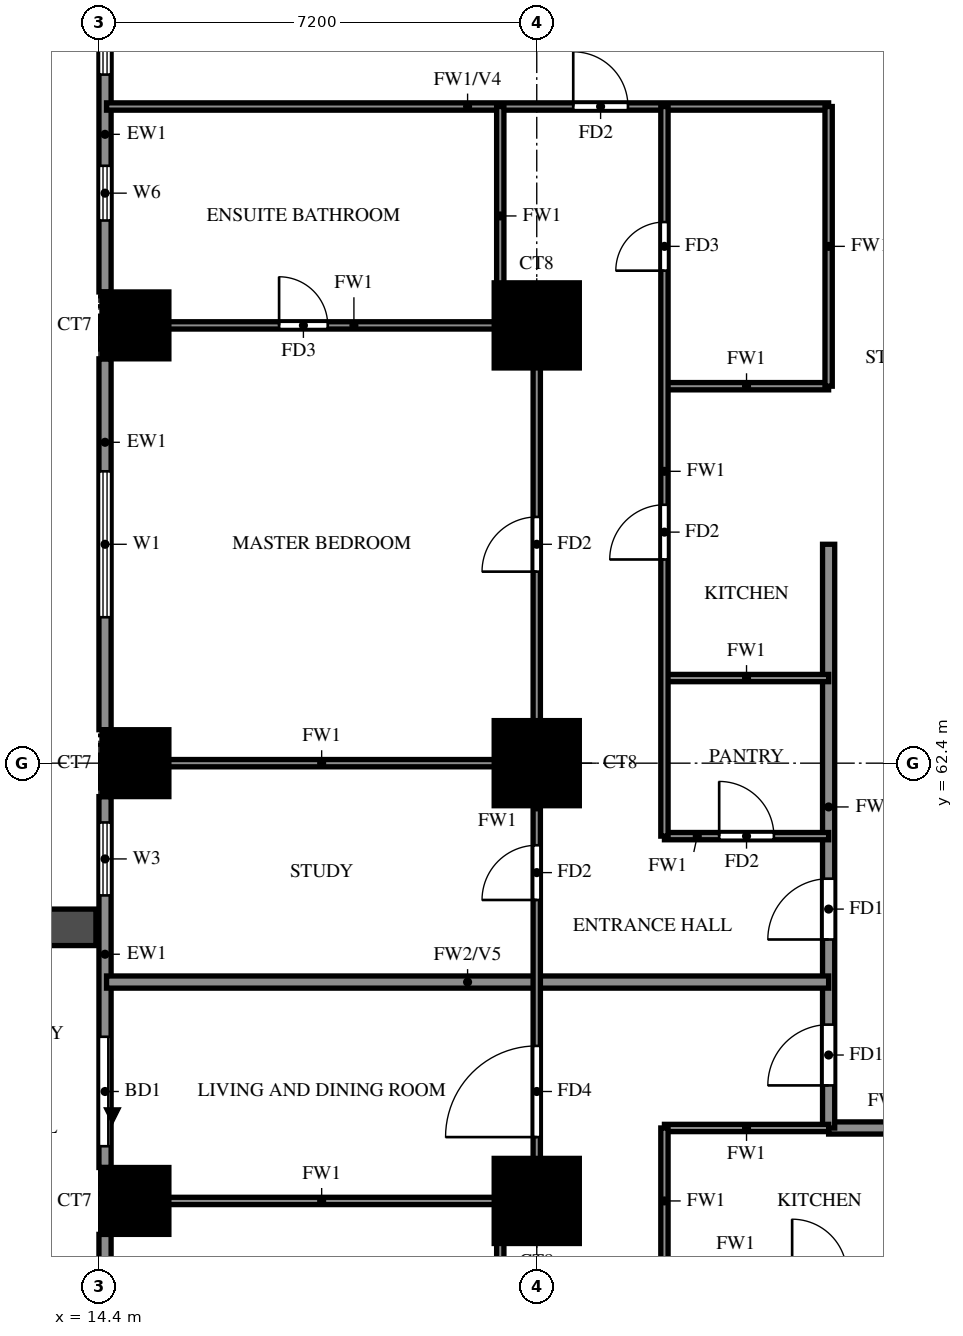
"""IFC4 building model, lengths in metres.
Left out: names, types, materials, properties, quantities, classifications, styles, units other than length and angle.
Written with IfcOpenShell. Run it as: python <this file> out.ifc"""

import sys

from ifc_helpers import new_model, si_unit, direction, frame, frame_2d, origin, origin_2d, place, context, subcontext, project, spatial, rectangle, extrude, source, transform, mapped, element, fill, save


model = new_model("IFC4")
c1 = context("Model", 3, precision=1e-05, world=origin(), true_north=direction((0.0, 1.0)))
c2 = subcontext(c1, "Body", "Model", "MODEL_VIEW")
j1 = project(units=[si_unit("LENGTHUNIT", "METRE"), si_unit("PLANEANGLEUNIT", "RADIAN")], contexts=[c1])
p1 = place(None, origin())
s1 = spatial("IfcSite", under=j1, at=p1, CompositionType="ELEMENT")
p2 = place(p1, origin())
s2 = spatial("IfcBuilding", under=s1, at=p2, CompositionType="ELEMENT")
p3 = place(p2, frame((0.0, 0.0, 51.5)))
s3 = spatial("IfcBuildingStorey", under=s2, at=p3, CompositionType="ELEMENT", Elevation=51.5)
m1 = source(origin(), c2, "Body", "SweptSolid", [
    extrude(rectangle(XDim=1.1, YDim=1.1, at=origin_2d()), origin(), (0.0, 0.0, 1.0), 3.18),
])
p4 = place(p3, frame((15.0, 55.2, 0.0), z_axis=(0.0, 0.0, 1.0), x_axis=(1.0, 0.0, 0.0)))
e1 = element("IfcColumn", 1, at=p4, inside=s3, PredefinedType="COLUMN", context=c2, shape_type="MappedRepresentation", body=[
    mapped(m1, transform((0.0, 0.0, 0.0))),
])
m2 = source(origin(), c2, "Body", "SweptSolid", [
    extrude(rectangle(XDim=1.4, YDim=1.4, at=origin_2d()), origin(), (0.0, 0.0, 1.0), 3.18),
])
p5 = place(p3, frame((21.6, 55.2, 0.0), z_axis=(0.0, 0.0, 1.0), x_axis=(1.0, 0.0, 0.0)))
e2 = element("IfcColumn", 2, at=p5, inside=s3, PredefinedType="COLUMN", context=c2, shape_type="MappedRepresentation", body=[
    mapped(m2, transform((0.0, 0.0, 0.0))),
])
p6 = place(p3, frame((15.0, 62.4, 0.0), z_axis=(0.0, 0.0, 1.0), x_axis=(1.0, 0.0, 0.0)))
e3 = element("IfcColumn", 3, at=p6, inside=s3, PredefinedType="COLUMN", context=c2, shape_type="MappedRepresentation", body=[
    mapped(m1, transform((0.0, 0.0, 0.0))),
])
p7 = place(p3, frame((21.6, 62.4, 0.0), z_axis=(0.0, 0.0, 1.0), x_axis=(1.0, 0.0, 0.0)))
e4 = element("IfcColumn", 4, at=p7, inside=s3, PredefinedType="COLUMN", context=c2, shape_type="MappedRepresentation", body=[
    mapped(m2, transform((0.0, 0.0, 0.0))),
])
p8 = place(p3, frame((15.0, 69.6, 0.0), z_axis=(0.0, 0.0, 1.0), x_axis=(1.0, 0.0, 0.0)))
e5 = element("IfcColumn", 5, at=p8, inside=s3, PredefinedType="COLUMN", context=c2, shape_type="MappedRepresentation", body=[
    mapped(m1, transform((0.0, 0.0, 0.0))),
])
p9 = place(p3, frame((21.6, 69.6, 0.0), z_axis=(0.0, 0.0, 1.0), x_axis=(1.0, 0.0, 0.0)))
e6 = element("IfcColumn", 6, at=p9, inside=s3, PredefinedType="COLUMN", context=c2, shape_type="MappedRepresentation", body=[
    mapped(m2, transform((0.0, 0.0, 0.0))),
])
p10 = place(p3, frame((14.5, 76.25, 0.0), z_axis=(0.0, 0.0, 1.0), x_axis=(0.0, -1.0, 0.0)))
e7 = element("IfcWall", 7, at=p10, inside=s3, PredefinedType="SOLIDWALL", context=c2, shape_type="SweptSolid", body=[
    extrude(rectangle(XDim=6.1, YDim=0.2, at=frame_2d((3.05, 0.0))), origin(), (0.0, 0.0, 1.0), 3.18),
])
p11 = place(p10, frame((4.025, 0.0, 1.5)))
e8 = element("IfcOpeningElement", 8, at=p11, cuts=e7, PredefinedType="OPENING", context=c2, shape_type="SweptSolid", body=[
    extrude(rectangle(XDim=0.9, YDim=0.9, at=frame_2d((0.45, 0.45))), frame((0.0, 0.11, 0.0), z_axis=(0.0, -1.0, 0.0), x_axis=(1.0, 0.0, 0.0)), (0.0, 0.0, 1.0), 0.22),
])
p12 = place(p10, frame((0.725, 0.0, 0.6)))
e9 = element("IfcOpeningElement", 9, at=p12, cuts=e7, PredefinedType="OPENING", context=c2, shape_type="SweptSolid", body=[
    extrude(rectangle(XDim=1.8, YDim=2.4, at=frame_2d((0.9, 1.2))), frame((0.0, 0.11, 0.0), z_axis=(0.0, -1.0, 0.0), x_axis=(1.0, 0.0, 0.0)), (0.0, 0.0, 1.0), 0.22),
])
p13 = place(p3, frame((14.5, 69.05, 0.0), z_axis=(0.0, 0.0, 1.0), x_axis=(0.0, -1.0, 0.0)))
e10 = element("IfcWall", 10, at=p13, inside=s3, PredefinedType="SOLIDWALL", context=c2, shape_type="SweptSolid", body=[
    extrude(rectangle(XDim=6.1, YDim=0.2, at=frame_2d((3.05, 0.0))), origin(), (0.0, 0.0, 1.0), 3.18),
])
p14 = place(p13, frame((1.85, 0.0, 0.6)))
e11 = element("IfcOpeningElement", 11, at=p14, cuts=e10, PredefinedType="OPENING", context=c2, shape_type="SweptSolid", body=[
    extrude(rectangle(XDim=2.4, YDim=2.4, at=frame_2d((1.2, 1.2))), frame((0.0, 0.11, 0.0), z_axis=(0.0, -1.0, 0.0), x_axis=(1.0, 0.0, 0.0)), (0.0, 0.0, 1.0), 0.22),
])
p15 = place(p3, frame((14.5, 61.85, 0.0), z_axis=(0.0, 0.0, 1.0), x_axis=(0.0, -1.0, 0.0)))
e12 = element("IfcWall", 12, at=p15, inside=s3, PredefinedType="SOLIDWALL", context=c2, shape_type="SweptSolid", body=[
    extrude(rectangle(XDim=6.1, YDim=0.2, at=frame_2d((3.05, 0.0))), origin(), (0.0, 0.0, 1.0), 3.18),
])
p16 = place(p15, frame((3.95, 0.0, 0.0)))
e13 = element("IfcOpeningElement", 13, at=p16, cuts=e12, PredefinedType="OPENING", context=c2, shape_type="SweptSolid", body=[
    extrude(rectangle(XDim=1.8, YDim=2.4, at=frame_2d((0.9, 1.2))), frame((0.0, 0.11, 0.0), z_axis=(0.0, -1.0, 0.0), x_axis=(1.0, 0.0, 0.0)), (0.0, 0.0, 1.0), 0.22),
])
p17 = place(p15, frame((0.425, 0.0, 0.6)))
e14 = element("IfcOpeningElement", 14, at=p17, cuts=e12, PredefinedType="OPENING", context=c2, shape_type="SweptSolid", body=[
    extrude(rectangle(XDim=1.2, YDim=2.4, at=frame_2d((0.6, 1.2))), frame((0.0, 0.11, 0.0), z_axis=(0.0, -1.0, 0.0), x_axis=(1.0, 0.0, 0.0)), (0.0, 0.0, 1.0), 0.22),
])
p18 = place(p3, frame((14.5, 54.65, 0.0), z_axis=(0.0, 0.0, 1.0), x_axis=(0.0, -1.0, 0.0)))
e15 = element("IfcWall", 15, at=p18, inside=s3, PredefinedType="SOLIDWALL", context=c2, shape_type="SweptSolid", body=[
    extrude(rectangle(XDim=6.1, YDim=0.2, at=frame_2d((3.05, 0.0))), origin(), (0.0, 0.0, 1.0), 3.18),
])
p19 = place(p18, frame((3.575, 0.0, 0.6)))
e16 = element("IfcOpeningElement", 16, at=p19, cuts=e15, PredefinedType="OPENING", context=c2, shape_type="SweptSolid", body=[
    extrude(rectangle(XDim=1.8, YDim=2.4, at=frame_2d((0.9, 1.2))), frame((0.0, 0.11, 0.0), z_axis=(0.0, -1.0, 0.0), x_axis=(1.0, 0.0, 0.0)), (0.0, 0.0, 1.0), 0.22),
])
p20 = place(p18, frame((2.0, 0.0, 1.5)))
e17 = element("IfcOpeningElement", 17, at=p20, cuts=e15, PredefinedType="OPENING", context=c2, shape_type="SweptSolid", body=[
    extrude(rectangle(XDim=0.9, YDim=0.9, at=frame_2d((0.45, 0.45))), frame((0.0, 0.11, 0.0), z_axis=(0.0, -1.0, 0.0), x_axis=(1.0, 0.0, 0.0)), (0.0, 0.0, 1.0), 0.22),
])
p21 = place(p3, frame((14.35, 59.7, 0.0), z_axis=(0.0, 0.0, 1.0), x_axis=(-1.0, 0.0, 0.0)))
e18 = element("IfcWall", 18, at=p21, inside=s3, PredefinedType="SOLIDWALL", context=c2, shape_type="SweptSolid", body=[
    extrude(rectangle(XDim=2.65, YDim=0.6, at=frame_2d((1.325, 0.0))), origin(), (0.0, 0.0, 1.0), 2.85),
])
p22 = place(p3, frame((26.4, 56.4, 0.0), z_axis=(0.0, 0.0, 1.0), x_axis=(1.0, 0.0, 0.0)))
e19 = element("IfcWall", 19, at=p22, inside=s3, PredefinedType="SOLIDWALL", context=c2, shape_type="SweptSolid", body=[
    extrude(rectangle(XDim=2.4, YDim=0.2, at=frame_2d((1.2, 0.0))), origin(), (0.0, 0.0, 1.0), 3.18),
])
p23 = place(p3, frame((26.4, 56.4, 0.0), z_axis=(0.0, 0.0, 1.0), x_axis=(0.0, 1.0, 0.0)))
e20 = element("IfcWall", 20, at=p23, inside=s3, PredefinedType="SOLIDWALL", context=c2, shape_type="SweptSolid", body=[
    extrude(rectangle(XDim=9.6, YDim=0.2, at=frame_2d((4.8, 0.0))), origin(), (0.0, 0.0, 1.0), 3.18),
])
p24 = place(p23, frame((0.7, 0.0, 0.0)))
e21 = element("IfcOpeningElement", 21, at=p24, cuts=e20, PredefinedType="OPENING", context=c2, shape_type="SweptSolid", body=[
    extrude(rectangle(XDim=1.0, YDim=2.1, at=frame_2d((0.5, 1.05))), frame((0.0, 0.11, 0.0), z_axis=(0.0, -1.0, 0.0), x_axis=(1.0, 0.0, 0.0)), (0.0, 0.0, 1.0), 0.22),
])
p25 = place(p23, frame((3.1, 0.0, 0.0)))
e22 = element("IfcOpeningElement", 22, at=p25, cuts=e20, PredefinedType="OPENING", context=c2, shape_type="SweptSolid", body=[
    extrude(rectangle(XDim=1.0, YDim=2.1, at=frame_2d((0.5, 1.05))), frame((0.0, 0.11, 0.0), z_axis=(0.0, -1.0, 0.0), x_axis=(1.0, 0.0, 0.0)), (0.0, 0.0, 1.0), 0.22),
])
p26 = place(p3, frame((14.525, 58.8, 0.0), z_axis=(0.0, 0.0, 1.0), x_axis=(1.0, 0.0, 0.0)))
e23 = element("IfcWall", 23, at=p26, inside=s3, PredefinedType="SOLIDWALL", context=c2, shape_type="SweptSolid", body=[
    extrude(rectangle(XDim=11.875, YDim=0.2, at=frame_2d((5.938, 0.0))), origin(), (0.0, 0.0, 1.0), 2.28),
])
p27 = place(p3, frame((14.525, 55.2, 0.0), z_axis=(0.0, 0.0, 1.0), x_axis=(1.0, 0.0, 0.0)))
e24 = element("IfcWall", 24, at=p27, inside=s3, PredefinedType="PARTITIONING", context=c2, shape_type="SweptSolid", body=[
    extrude(rectangle(XDim=7.075, YDim=0.12, at=frame_2d((3.538, 0.0))), origin(), (0.0, 0.0, 1.0), 3.18),
])
p28 = place(p3, frame((23.7, 56.4, 0.0), z_axis=(0.0, 0.0, 1.0), x_axis=(1.0, 0.0, 0.0)))
e25 = element("IfcWall", 25, at=p28, inside=s3, PredefinedType="PARTITIONING", context=c2, shape_type="SweptSolid", body=[
    extrude(rectangle(XDim=2.7, YDim=0.12, at=frame_2d((1.35, 0.0))), origin(), (0.0, 0.0, 1.0), 3.18),
])
p29 = place(p3, frame((23.7, 61.2, 0.0), z_axis=(0.0, 0.0, 1.0), x_axis=(1.0, 0.0, 0.0)))
e26 = element("IfcWall", 26, at=p29, inside=s3, PredefinedType="PARTITIONING", context=c2, shape_type="SweptSolid", body=[
    extrude(rectangle(XDim=2.7, YDim=0.12, at=frame_2d((1.35, 0.0))), origin(), (0.0, 0.0, 1.0), 3.18),
])
p30 = place(p29, frame((0.9, 0.0, 0.0)))
e27 = element("IfcOpeningElement", 27, at=p30, cuts=e26, PredefinedType="OPENING", context=c2, shape_type="SweptSolid", body=[
    extrude(rectangle(XDim=0.9, YDim=2.1, at=frame_2d((0.45, 1.05))), frame((0.0, 0.07, 0.0), z_axis=(0.0, -1.0, 0.0), x_axis=(1.0, 0.0, 0.0)), (0.0, 0.0, 1.0), 0.14),
])
p31 = place(p3, frame((14.525, 62.4, 0.0), z_axis=(0.0, 0.0, 1.0), x_axis=(1.0, 0.0, 0.0)))
e28 = element("IfcWall", 28, at=p31, inside=s3, PredefinedType="PARTITIONING", context=c2, shape_type="SweptSolid", body=[
    extrude(rectangle(XDim=7.075, YDim=0.12, at=frame_2d((3.538, 0.0))), origin(), (0.0, 0.0, 1.0), 3.18),
])
for number, where, z_axis, x_axis in (
    (29, (23.7, 63.8, 0.0), (0.0, 0.0, 1.0), (1.0, 0.0, 0.0)),
    (30, (23.7, 68.6, 0.0), (0.0, 0.0, 1.0), (1.0, 0.0, 0.0)),
):
    element("IfcWall", number, at=place(p3, frame(where, z_axis=z_axis, x_axis=x_axis)), inside=s3, PredefinedType="PARTITIONING", context=c2, shape_type="SweptSolid", body=[
        extrude(rectangle(XDim=2.7, YDim=0.12, at=frame_2d((1.35, 0.0))), origin(), (0.0, 0.0, 1.0), 3.18),
    ])
p32 = place(p3, frame((14.525, 69.6, 0.0), z_axis=(0.0, 0.0, 1.0), x_axis=(1.0, 0.0, 0.0)))
e31 = element("IfcWall", 31, at=p32, inside=s3, PredefinedType="PARTITIONING", context=c2, shape_type="SweptSolid", body=[
    extrude(rectangle(XDim=7.075, YDim=0.12, at=frame_2d((3.538, 0.0))), origin(), (0.0, 0.0, 1.0), 3.18),
])
p33 = place(p32, frame((2.837, 0.0, 0.0)))
e32 = element("IfcOpeningElement", 32, at=p33, cuts=e31, PredefinedType="OPENING", context=c2, shape_type="SweptSolid", body=[
    extrude(rectangle(XDim=0.8, YDim=2.1, at=frame_2d((0.4, 1.05))), frame((0.0, 0.07, 0.0), z_axis=(0.0, -1.0, 0.0), x_axis=(1.0, 0.0, 0.0)), (0.0, 0.0, 1.0), 0.14),
])
p34 = place(p3, frame((14.525, 73.2, 0.0), z_axis=(0.0, 0.0, 1.0), x_axis=(1.0, 0.0, 0.0)))
e33 = element("IfcWall", 33, at=p34, inside=s3, PredefinedType="PARTITIONING", context=c2, shape_type="SweptSolid", body=[
    extrude(rectangle(XDim=11.875, YDim=0.12, at=frame_2d((5.938, 0.0))), origin(), (0.0, 0.0, 1.0), 2.28),
])
p35 = place(p34, frame((7.675, 0.0, 0.0)))
e34 = element("IfcOpeningElement", 34, at=p35, cuts=e33, PredefinedType="OPENING", context=c2, shape_type="SweptSolid", body=[
    extrude(rectangle(XDim=0.9, YDim=2.1, at=frame_2d((0.45, 1.05))), frame((0.0, 0.07, 0.0), z_axis=(0.0, -1.0, 0.0), x_axis=(1.0, 0.0, 0.0)), (0.0, 0.0, 1.0), 0.14),
])
for number, where, z_axis, x_axis in (
    (35, (21.0, 51.6, 0.0), (0.0, 0.0, 1.0), (0.0, 1.0, 0.0)),
    (36, (21.0, 69.6, 0.0), (0.0, 0.0, 1.0), (0.0, 1.0, 0.0)),
):
    element("IfcWall", number, at=place(p3, frame(where, z_axis=z_axis, x_axis=x_axis)), inside=s3, PredefinedType="PARTITIONING", context=c2, shape_type="SweptSolid", body=[
        extrude(rectangle(XDim=3.6, YDim=0.12, at=frame_2d((1.8, 0.0))), origin(), (0.0, 0.0, 1.0), 3.18),
    ])
p36 = place(p3, frame((21.6, 55.2, 0.0), z_axis=(0.0, 0.0, 1.0), x_axis=(0.0, 1.0, 0.0)))
e37 = element("IfcWall", 37, at=p36, inside=s3, PredefinedType="PARTITIONING", context=c2, shape_type="SweptSolid", body=[
    extrude(rectangle(XDim=14.4, YDim=0.12, at=frame_2d((7.2, 0.0))), origin(), (0.0, 0.0, 1.0), 3.18),
])
p37 = place(p36, frame((1.05, 0.0, 0.0)))
e38 = element("IfcOpeningElement", 38, at=p37, cuts=e37, PredefinedType="OPENING", context=c2, shape_type="SweptSolid", body=[
    extrude(rectangle(XDim=1.5, YDim=2.1, at=frame_2d((0.75, 1.05))), frame((0.0, 0.07, 0.0), z_axis=(0.0, -1.0, 0.0), x_axis=(1.0, 0.0, 0.0)), (0.0, 0.0, 1.0), 0.14),
])
p38 = place(p36, frame((4.95, 0.0, 0.0)))
e39 = element("IfcOpeningElement", 39, at=p38, cuts=e37, PredefinedType="OPENING", context=c2, shape_type="SweptSolid", body=[
    extrude(rectangle(XDim=0.9, YDim=2.1, at=frame_2d((0.45, 1.05))), frame((0.0, 0.07, 0.0), z_axis=(0.0, -1.0, 0.0), x_axis=(1.0, 0.0, 0.0)), (0.0, 0.0, 1.0), 0.14),
])
p39 = place(p36, frame((10.35, 0.0, 0.0)))
e40 = element("IfcOpeningElement", 40, at=p39, cuts=e37, PredefinedType="OPENING", context=c2, shape_type="SweptSolid", body=[
    extrude(rectangle(XDim=0.9, YDim=2.1, at=frame_2d((0.45, 1.05))), frame((0.0, 0.07, 0.0), z_axis=(0.0, -1.0, 0.0), x_axis=(1.0, 0.0, 0.0)), (0.0, 0.0, 1.0), 0.14),
])
p40 = place(p3, frame((23.7, 54.0, 0.0), z_axis=(0.0, 0.0, 1.0), x_axis=(0.0, 1.0, 0.0)))
e41 = element("IfcWall", 41, at=p40, inside=s3, PredefinedType="PARTITIONING", context=c2, shape_type="SweptSolid", body=[
    extrude(rectangle(XDim=2.4, YDim=0.12, at=frame_2d((1.2, 0.0))), origin(), (0.0, 0.0, 1.0), 3.18),
])
p41 = place(p3, frame((23.7, 61.2, 0.0), z_axis=(0.0, 0.0, 1.0), x_axis=(0.0, 1.0, 0.0)))
e42 = element("IfcWall", 42, at=p41, inside=s3, PredefinedType="PARTITIONING", context=c2, shape_type="SweptSolid", body=[
    extrude(rectangle(XDim=12.0, YDim=0.12, at=frame_2d((6.0, 0.0))), origin(), (0.0, 0.0, 1.0), 3.18),
])
p42 = place(p41, frame((4.55, 0.0, 0.0)))
e43 = element("IfcOpeningElement", 43, at=p42, cuts=e42, PredefinedType="OPENING", context=c2, shape_type="SweptSolid", body=[
    extrude(rectangle(XDim=0.9, YDim=2.1, at=frame_2d((0.45, 1.05))), frame((0.0, 0.07, 0.0), z_axis=(0.0, -1.0, 0.0), x_axis=(1.0, 0.0, 0.0)), (0.0, 0.0, 1.0), 0.14),
])
p43 = place(p41, frame((9.3, 0.0, 0.0)))
e44 = element("IfcOpeningElement", 44, at=p43, cuts=e42, PredefinedType="OPENING", context=c2, shape_type="SweptSolid", body=[
    extrude(rectangle(XDim=0.8, YDim=2.1, at=frame_2d((0.4, 1.05))), frame((0.0, 0.07, 0.0), z_axis=(0.0, -1.0, 0.0), x_axis=(1.0, 0.0, 0.0)), (0.0, 0.0, 1.0), 0.14),
])
p44 = place(p3, frame((26.4, 68.6, 0.0), z_axis=(0.0, 0.0, 1.0), x_axis=(0.0, 1.0, 0.0)))
e45 = element("IfcWall", 45, at=p44, inside=s3, PredefinedType="PARTITIONING", context=c2, shape_type="SweptSolid", body=[
    extrude(rectangle(XDim=4.6, YDim=0.12, at=frame_2d((2.3, 0.0))), origin(), (0.0, 0.0, 1.0), 3.18),
])
p45 = place(p11, origin())
e46 = element("IfcWindow", 46, at=p45, inside=s3, PartitioningType="SINGLE_PANEL", PredefinedType="WINDOW", context=c2, shape_type="SweptSolid", body=[
    extrude(rectangle(XDim=0.9, YDim=0.9, at=frame_2d((0.45, 0.45))), frame((0.0, 0.03, 0.0), z_axis=(0.0, -1.0, 0.0), x_axis=(1.0, 0.0, 0.0)), (0.0, 0.0, 1.0), 0.06),
])
fill(e8, e46)
p46 = place(p12, origin())
e47 = element("IfcWindow", 47, at=p46, inside=s3, PartitioningType="DOUBLE_PANEL_VERTICAL", PredefinedType="WINDOW", context=c2, shape_type="SweptSolid", body=[
    extrude(rectangle(XDim=1.8, YDim=2.4, at=frame_2d((0.9, 1.2))), frame((0.0, 0.03, 0.0), z_axis=(0.0, -1.0, 0.0), x_axis=(1.0, 0.0, 0.0)), (0.0, 0.0, 1.0), 0.06),
])
fill(e9, e47)
p47 = place(p14, origin())
e48 = element("IfcWindow", 48, at=p47, inside=s3, PartitioningType="DOUBLE_PANEL_VERTICAL", PredefinedType="WINDOW", context=c2, shape_type="SweptSolid", body=[
    extrude(rectangle(XDim=2.4, YDim=2.4, at=frame_2d((1.2, 1.2))), frame((0.0, 0.03, 0.0), z_axis=(0.0, -1.0, 0.0), x_axis=(1.0, 0.0, 0.0)), (0.0, 0.0, 1.0), 0.06),
])
fill(e11, e48)
p48 = place(p16, origin())
e49 = element("IfcDoor", 49, at=p48, inside=s3, OperationType="DOUBLE_DOOR_SLIDING", PredefinedType="DOOR", context=c2, shape_type="SweptSolid", body=[
    extrude(rectangle(XDim=1.8, YDim=2.4, at=frame_2d((0.9, 1.2))), frame((0.0, 0.025, 0.0), z_axis=(0.0, -1.0, 0.0), x_axis=(1.0, 0.0, 0.0)), (0.0, 0.0, 1.0), 0.05),
])
fill(e13, e49)
p49 = place(p17, origin())
e50 = element("IfcWindow", 50, at=p49, inside=s3, PartitioningType="SINGLE_PANEL", PredefinedType="WINDOW", context=c2, shape_type="SweptSolid", body=[
    extrude(rectangle(XDim=1.2, YDim=2.4, at=frame_2d((0.6, 1.2))), frame((0.0, 0.03, 0.0), z_axis=(0.0, -1.0, 0.0), x_axis=(1.0, 0.0, 0.0)), (0.0, 0.0, 1.0), 0.06),
])
fill(e14, e50)
p50 = place(p24, origin())
e51 = element("IfcDoor", 51, at=p50, inside=s3, OperationType="SINGLE_SWING_LEFT", PredefinedType="DOOR", context=c2, shape_type="SweptSolid", body=[
    extrude(rectangle(XDim=1.0, YDim=2.1, at=frame_2d((0.5, 1.05))), frame((0.0, 0.025, 0.0), z_axis=(0.0, -1.0, 0.0), x_axis=(1.0, 0.0, 0.0)), (0.0, 0.0, 1.0), 0.05),
])
fill(e21, e51)
p51 = place(p37, origin())
e52 = element("IfcDoor", 52, at=p51, inside=s3, OperationType="SINGLE_SWING_LEFT", PredefinedType="DOOR", context=c2, shape_type="SweptSolid", body=[
    extrude(rectangle(XDim=1.5, YDim=2.1, at=frame_2d((0.75, 1.05))), frame((0.0, 0.025, 0.0), z_axis=(0.0, -1.0, 0.0), x_axis=(1.0, 0.0, 0.0)), (0.0, 0.0, 1.0), 0.05),
])
fill(e38, e52)
p52 = place(p25, origin())
e53 = element("IfcDoor", 53, at=p52, inside=s3, OperationType="SINGLE_SWING_RIGHT", PredefinedType="DOOR", context=c2, shape_type="SweptSolid", body=[
    extrude(rectangle(XDim=1.0, YDim=2.1, at=frame_2d((0.5, 1.05))), frame((0.0, 0.025, 0.0), z_axis=(0.0, -1.0, 0.0), x_axis=(1.0, 0.0, 0.0)), (0.0, 0.0, 1.0), 0.05),
])
fill(e22, e53)
p53 = place(p38, origin())
e54 = element("IfcDoor", 54, at=p53, inside=s3, OperationType="SINGLE_SWING_LEFT", PredefinedType="DOOR", context=c2, shape_type="SweptSolid", body=[
    extrude(rectangle(XDim=0.9, YDim=2.1, at=frame_2d((0.45, 1.05))), frame((0.0, 0.025, 0.0), z_axis=(0.0, -1.0, 0.0), x_axis=(1.0, 0.0, 0.0)), (0.0, 0.0, 1.0), 0.05),
])
fill(e39, e54)
p54 = place(p39, origin())
e55 = element("IfcDoor", 55, at=p54, inside=s3, OperationType="SINGLE_SWING_LEFT", PredefinedType="DOOR", context=c2, shape_type="SweptSolid", body=[
    extrude(rectangle(XDim=0.9, YDim=2.1, at=frame_2d((0.45, 1.05))), frame((0.0, 0.025, 0.0), z_axis=(0.0, -1.0, 0.0), x_axis=(1.0, 0.0, 0.0)), (0.0, 0.0, 1.0), 0.05),
])
fill(e40, e55)
p55 = place(p33, origin())
e56 = element("IfcDoor", 56, at=p55, inside=s3, OperationType="SINGLE_SWING_RIGHT", PredefinedType="DOOR", context=c2, shape_type="SweptSolid", body=[
    extrude(rectangle(XDim=0.8, YDim=2.1, at=frame_2d((0.4, 1.05))), frame((0.0, 0.025, 0.0), z_axis=(0.0, -1.0, 0.0), x_axis=(1.0, 0.0, 0.0)), (0.0, 0.0, 1.0), 0.05),
])
fill(e32, e56)
p56 = place(p35, origin())
e57 = element("IfcDoor", 57, at=p56, inside=s3, OperationType="SINGLE_SWING_LEFT", PredefinedType="DOOR", context=c2, shape_type="SweptSolid", body=[
    extrude(rectangle(XDim=0.9, YDim=2.1, at=frame_2d((0.45, 1.05))), frame((0.0, 0.025, 0.0), z_axis=(0.0, -1.0, 0.0), x_axis=(1.0, 0.0, 0.0)), (0.0, 0.0, 1.0), 0.05),
])
fill(e34, e57)
p57 = place(p30, origin())
e58 = element("IfcDoor", 58, at=p57, inside=s3, OperationType="SINGLE_SWING_LEFT", PredefinedType="DOOR", context=c2, shape_type="SweptSolid", body=[
    extrude(rectangle(XDim=0.9, YDim=2.1, at=frame_2d((0.45, 1.05))), frame((0.0, 0.025, 0.0), z_axis=(0.0, -1.0, 0.0), x_axis=(1.0, 0.0, 0.0)), (0.0, 0.0, 1.0), 0.05),
])
fill(e27, e58)
p58 = place(p42, origin())
e59 = element("IfcDoor", 59, at=p58, inside=s3, OperationType="SINGLE_SWING_RIGHT", PredefinedType="DOOR", context=c2, shape_type="SweptSolid", body=[
    extrude(rectangle(XDim=0.9, YDim=2.1, at=frame_2d((0.45, 1.05))), frame((0.0, 0.025, 0.0), z_axis=(0.0, -1.0, 0.0), x_axis=(1.0, 0.0, 0.0)), (0.0, 0.0, 1.0), 0.05),
])
fill(e43, e59)
p59 = place(p43, origin())
e60 = element("IfcDoor", 60, at=p59, inside=s3, OperationType="SINGLE_SWING_LEFT", PredefinedType="DOOR", context=c2, shape_type="SweptSolid", body=[
    extrude(rectangle(XDim=0.8, YDim=2.1, at=frame_2d((0.4, 1.05))), frame((0.0, 0.025, 0.0), z_axis=(0.0, -1.0, 0.0), x_axis=(1.0, 0.0, 0.0)), (0.0, 0.0, 1.0), 0.05),
])
fill(e44, e60)
save(model, sys.argv[1])
